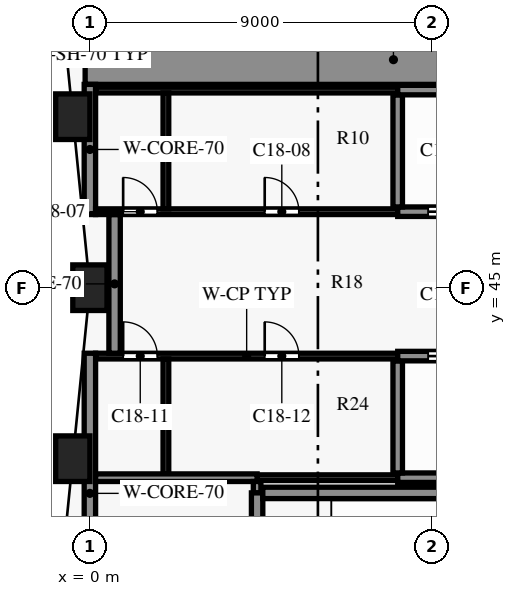
"""IFC4 building model, lengths in metres.
Left out: names, types, materials, properties, quantities, classifications, styles, units other than length and angle.
Written with IfcOpenShell. Run it as: python <this file> out.ifc"""

import sys

from ifc_helpers import new_model, si_unit, direction, frame, frame_2d, origin, origin_2d, place, context, subcontext, project, spatial, rectangle, extrude, element, fill, save


model = new_model("IFC4")
c1 = context("Model", 3, precision=1e-05, world=origin(), true_north=direction((0.0, 1.0)))
c2 = subcontext(c1, "Body", "Model", "MODEL_VIEW")
j1 = project(units=[si_unit("LENGTHUNIT", "METRE"), si_unit("PLANEANGLEUNIT", "RADIAN")], contexts=[c1])
p1 = place(None, origin())
s1 = spatial("IfcSite", under=j1, at=p1, CompositionType="ELEMENT")
p2 = place(p1, origin())
s2 = spatial("IfcBuilding", under=s1, at=p2, CompositionType="ELEMENT")
p3 = place(p2, frame((0.0, 0.0, 130.3)))
s3 = spatial("IfcBuildingStorey", under=s2, at=p3, CompositionType="ELEMENT", Elevation=130.3)
for number, where, z_axis, x_axis in (
    (1, (-0.45, 49.5, 0.0), (0.0, 0.0, 1.0), (0.1, -0.995, 0.0)),
    (2, (0.0, 45.0, 0.0), (0.0, 0.0, 1.0), (0.0, -1.0, 0.0)),
    (3, (-0.45, 40.5, 0.0), (0.0, 0.0, 1.0), (-0.1, -0.995, 0.0)),
):
    element("IfcColumn", number, at=place(p3, frame(where, z_axis=z_axis, x_axis=x_axis)), inside=s3, PredefinedType="COLUMN", context=c2, shape_type="SweptSolid", body=[
        extrude(rectangle(XDim=0.9, YDim=1.2, at=origin_2d()), origin(), (0.0, 0.0, 1.0), 3.8),
    ])
p4 = place(p3, frame((4.55, 39.6, 0.0), z_axis=(0.0, 0.0, 1.0), x_axis=(1.0, 0.0, 0.0)))
e4 = element("IfcWall", 4, at=p4, inside=s3, PredefinedType="SHEAR", context=c2, shape_type="SweptSolid", body=[
    extrude(rectangle(XDim=7.7, YDim=0.3, at=frame_2d((3.85, 0.0))), origin(), (0.0, 0.0, 1.0), 3.5),
])
p5 = place(p3, frame((4.4, 40.0, 0.0), z_axis=(0.0, 0.0, 1.0), x_axis=(1.0, 0.0, 0.0)))
e5 = element("IfcWall", 5, at=p5, inside=s3, PredefinedType="PARTITIONING", context=c2, shape_type="SweptSolid", body=[
    extrude(rectangle(XDim=3.7, YDim=0.15, at=frame_2d((1.85, 0.0))), origin(), (0.0, 0.0, 1.0), 3.5),
])
p6 = place(p3, frame((0.15, 40.0, 0.0), z_axis=(0.0, 0.0, 1.0), x_axis=(1.0, 0.0, 0.0)))
e6 = element("IfcWall", 6, at=p6, inside=s3, PredefinedType="PARTITIONING", context=c2, shape_type="SweptSolid", body=[
    extrude(rectangle(XDim=4.25, YDim=0.2, at=frame_2d((2.125, 0.0))), origin(), (0.0, 0.0, 1.0), 3.5),
])
p7 = place(p3, frame((8.1, 40.0, 0.0), z_axis=(0.0, 0.0, 1.0), x_axis=(1.0, 0.0, 0.0)))
e7 = element("IfcWall", 7, at=p7, inside=s3, PredefinedType="SHEAR", context=c2, shape_type="SweptSolid", body=[
    extrude(rectangle(XDim=13.5, YDim=0.25, at=frame_2d((6.75, 0.0))), origin(), (0.0, 0.0, 1.0), 3.5),
])
p8 = place(p3, frame((0.15, 43.2, 0.0), z_axis=(0.0, 0.0, 1.0), x_axis=(1.0, 0.0, 0.0)))
e8 = element("IfcWall", 8, at=p8, inside=s3, PredefinedType="PARTITIONING", context=c2, shape_type="SweptSolid", body=[
    extrude(rectangle(XDim=7.95, YDim=0.15, at=frame_2d((3.975, 0.0))), origin(), (0.0, 0.0, 1.0), 3.5),
])
p9 = place(p8, frame((0.725, 0.0, 0.0)))
e9 = element("IfcOpeningElement", 9, at=p9, cuts=e8, PredefinedType="OPENING", context=c2, shape_type="SweptSolid", body=[
    extrude(rectangle(XDim=0.9, YDim=2.1, at=frame_2d((0.45, 1.05))), frame((0.0, 0.085, 0.0), z_axis=(0.0, -1.0, 0.0), x_axis=(1.0, 0.0, 0.0)), (0.0, 0.0, 1.0), 0.17),
])
p10 = place(p8, frame((4.45, 0.0, 0.0)))
e10 = element("IfcOpeningElement", 10, at=p10, cuts=e8, PredefinedType="OPENING", context=c2, shape_type="SweptSolid", body=[
    extrude(rectangle(XDim=0.9, YDim=2.1, at=frame_2d((0.45, 1.05))), frame((0.0, 0.085, 0.0), z_axis=(0.0, -1.0, 0.0), x_axis=(1.0, 0.0, 0.0)), (0.0, 0.0, 1.0), 0.17),
])
p11 = place(p3, frame((8.1, 43.2, 0.0), z_axis=(0.0, 0.0, 1.0), x_axis=(1.0, 0.0, 0.0)))
e11 = element("IfcWall", 11, at=p11, inside=s3, PredefinedType="SHEAR", context=c2, shape_type="SweptSolid", body=[
    extrude(rectangle(XDim=13.5, YDim=0.25, at=frame_2d((6.75, 0.0))), origin(), (0.0, 0.0, 1.0), 3.5),
])
p12 = place(p11, frame((0.8, 0.0, 0.0)))
e12 = element("IfcOpeningElement", 12, at=p12, cuts=e11, PredefinedType="OPENING", context=c2, shape_type="SweptSolid", body=[
    extrude(rectangle(XDim=1.1, YDim=2.1, at=frame_2d((0.55, 1.05))), frame((0.0, 0.135, 0.0), z_axis=(0.0, -1.0, 0.0), x_axis=(1.0, 0.0, 0.0)), (0.0, 0.0, 1.0), 0.27),
])
p13 = place(p11, frame((3.5, 0.0, 0.0)))
e13 = element("IfcOpeningElement", 13, at=p13, cuts=e11, PredefinedType="OPENING", context=c2, shape_type="SweptSolid", body=[
    extrude(rectangle(XDim=1.1, YDim=2.1, at=frame_2d((0.55, 1.05))), frame((0.0, 0.135, 0.0), z_axis=(0.0, -1.0, 0.0), x_axis=(1.0, 0.0, 0.0)), (0.0, 0.0, 1.0), 0.27),
])
p14 = place(p11, frame((6.2, 0.0, 0.0)))
e14 = element("IfcOpeningElement", 14, at=p14, cuts=e11, PredefinedType="OPENING", context=c2, shape_type="SweptSolid", body=[
    extrude(rectangle(XDim=1.1, YDim=2.1, at=frame_2d((0.55, 1.05))), frame((0.0, 0.135, 0.0), z_axis=(0.0, -1.0, 0.0), x_axis=(1.0, 0.0, 0.0)), (0.0, 0.0, 1.0), 0.27),
])
p15 = place(p11, frame((8.9, 0.0, 0.0)))
e15 = element("IfcOpeningElement", 15, at=p15, cuts=e11, PredefinedType="OPENING", context=c2, shape_type="SweptSolid", body=[
    extrude(rectangle(XDim=1.1, YDim=2.1, at=frame_2d((0.55, 1.05))), frame((0.0, 0.135, 0.0), z_axis=(0.0, -1.0, 0.0), x_axis=(1.0, 0.0, 0.0)), (0.0, 0.0, 1.0), 0.27),
])
p16 = place(p11, frame((11.6, 0.0, 0.0)))
e16 = element("IfcOpeningElement", 16, at=p16, cuts=e11, PredefinedType="OPENING", context=c2, shape_type="SweptSolid", body=[
    extrude(rectangle(XDim=1.1, YDim=2.1, at=frame_2d((0.55, 1.05))), frame((0.0, 0.135, 0.0), z_axis=(0.0, -1.0, 0.0), x_axis=(1.0, 0.0, 0.0)), (0.0, 0.0, 1.0), 0.27),
])
p17 = place(p3, frame((0.15, 47.0, 0.0), z_axis=(0.0, 0.0, 1.0), x_axis=(1.0, 0.0, 0.0)))
e17 = element("IfcWall", 17, at=p17, inside=s3, PredefinedType="PARTITIONING", context=c2, shape_type="SweptSolid", body=[
    extrude(rectangle(XDim=7.95, YDim=0.15, at=frame_2d((3.975, 0.0))), origin(), (0.0, 0.0, 1.0), 3.5),
])
p18 = place(p17, frame((0.725, 0.0, 0.0)))
e18 = element("IfcOpeningElement", 18, at=p18, cuts=e17, PredefinedType="OPENING", context=c2, shape_type="SweptSolid", body=[
    extrude(rectangle(XDim=0.9, YDim=2.1, at=frame_2d((0.45, 1.05))), frame((0.0, 0.085, 0.0), z_axis=(0.0, -1.0, 0.0), x_axis=(1.0, 0.0, 0.0)), (0.0, 0.0, 1.0), 0.17),
])
p19 = place(p17, frame((4.45, 0.0, 0.0)))
e19 = element("IfcOpeningElement", 19, at=p19, cuts=e17, PredefinedType="OPENING", context=c2, shape_type="SweptSolid", body=[
    extrude(rectangle(XDim=0.9, YDim=2.1, at=frame_2d((0.45, 1.05))), frame((0.0, 0.085, 0.0), z_axis=(0.0, -1.0, 0.0), x_axis=(1.0, 0.0, 0.0)), (0.0, 0.0, 1.0), 0.17),
])
p20 = place(p3, frame((8.1, 47.0, 0.0), z_axis=(0.0, 0.0, 1.0), x_axis=(1.0, 0.0, 0.0)))
e20 = element("IfcWall", 20, at=p20, inside=s3, PredefinedType="SHEAR", context=c2, shape_type="SweptSolid", body=[
    extrude(rectangle(XDim=8.1, YDim=0.25, at=frame_2d((4.05, 0.0))), origin(), (0.0, 0.0, 1.0), 3.5),
])
p21 = place(p20, frame((0.8, 0.0, 0.0)))
e21 = element("IfcOpeningElement", 21, at=p21, cuts=e20, PredefinedType="OPENING", context=c2, shape_type="SweptSolid", body=[
    extrude(rectangle(XDim=1.1, YDim=2.1, at=frame_2d((0.55, 1.05))), frame((0.0, 0.135, 0.0), z_axis=(0.0, -1.0, 0.0), x_axis=(1.0, 0.0, 0.0)), (0.0, 0.0, 1.0), 0.27),
])
p22 = place(p20, frame((3.5, 0.0, 0.0)))
e22 = element("IfcOpeningElement", 22, at=p22, cuts=e20, PredefinedType="OPENING", context=c2, shape_type="SweptSolid", body=[
    extrude(rectangle(XDim=1.1, YDim=2.1, at=frame_2d((0.55, 1.05))), frame((0.0, 0.135, 0.0), z_axis=(0.0, -1.0, 0.0), x_axis=(1.0, 0.0, 0.0)), (0.0, 0.0, 1.0), 0.27),
])
p23 = place(p20, frame((6.2, 0.0, 0.0)))
e23 = element("IfcOpeningElement", 23, at=p23, cuts=e20, PredefinedType="OPENING", context=c2, shape_type="SweptSolid", body=[
    extrude(rectangle(XDim=1.1, YDim=2.1, at=frame_2d((0.55, 1.05))), frame((0.0, 0.135, 0.0), z_axis=(0.0, -1.0, 0.0), x_axis=(1.0, 0.0, 0.0)), (0.0, 0.0, 1.0), 0.27),
])
p24 = place(p3, frame((0.15, 50.2, 0.0), z_axis=(0.0, 0.0, 1.0), x_axis=(1.0, 0.0, 0.0)))
e24 = element("IfcWall", 24, at=p24, inside=s3, PredefinedType="PARTITIONING", context=c2, shape_type="SweptSolid", body=[
    extrude(rectangle(XDim=7.95, YDim=0.15, at=frame_2d((3.975, 0.0))), origin(), (0.0, 0.0, 1.0), 3.5),
])
p25 = place(p3, frame((8.1, 50.2, 0.0), z_axis=(0.0, 0.0, 1.0), x_axis=(1.0, 0.0, 0.0)))
e25 = element("IfcWall", 25, at=p25, inside=s3, PredefinedType="SHEAR", context=c2, shape_type="SweptSolid", body=[
    extrude(rectangle(XDim=7.975, YDim=0.25, at=frame_2d((3.987, 0.0))), origin(), (0.0, 0.0, 1.0), 3.5),
])
p26 = place(p3, frame((-0.125, 51.0, 0.0), z_axis=(0.0, 0.0, 1.0), x_axis=(1.0, 0.0, 0.0)))
e26 = element("IfcWall", 26, at=p26, inside=s3, PredefinedType="SHEAR", context=c2, shape_type="SweptSolid", body=[
    extrude(rectangle(XDim=16.225, YDim=1.3, at=frame_2d((8.113, 0.0))), origin(), (0.0, 0.0, 1.0), 3.5),
])
p27 = place(p3, frame((0.0, 35.9, 0.0), z_axis=(0.0, 0.0, 1.0), x_axis=(0.0, 1.0, 0.0)))
e27 = element("IfcWall", 27, at=p27, inside=s3, PredefinedType="SHEAR", context=c2, shape_type="SweptSolid", body=[
    extrude(rectangle(XDim=7.375, YDim=0.3, at=frame_2d((3.688, 0.0))), origin(), (0.0, 0.0, 1.0), 3.5),
])
p28 = place(p3, frame((0.0, 46.925, 0.0), z_axis=(0.0, 0.0, 1.0), x_axis=(0.0, 1.0, 0.0)))
e28 = element("IfcWall", 28, at=p28, inside=s3, PredefinedType="SHEAR", context=c2, shape_type="SweptSolid", body=[
    extrude(rectangle(XDim=3.425, YDim=0.3, at=frame_2d((1.712, 0.0))), origin(), (0.0, 0.0, 1.0), 3.5),
])
p29 = place(p3, frame((0.65, 43.275, 0.0), z_axis=(0.0, 0.0, 1.0), x_axis=(0.0, 1.0, 0.0)))
e29 = element("IfcWall", 29, at=p29, inside=s3, PredefinedType="SHEAR", context=c2, shape_type="SweptSolid", body=[
    extrude(rectangle(XDim=3.65, YDim=0.3, at=frame_2d((1.825, 0.0))), origin(), (0.0, 0.0, 1.0), 3.5),
])
p30 = place(p3, frame((2.0, 40.1, 0.0), z_axis=(0.0, 0.0, 1.0), x_axis=(0.0, 1.0, 0.0)))
e30 = element("IfcWall", 30, at=p30, inside=s3, PredefinedType="PARTITIONING", context=c2, shape_type="SweptSolid", body=[
    extrude(rectangle(XDim=3.025, YDim=0.15, at=frame_2d((1.512, 0.0))), origin(), (0.0, 0.0, 1.0), 3.5),
])
p31 = place(p3, frame((2.0, 47.075, 0.0), z_axis=(0.0, 0.0, 1.0), x_axis=(0.0, 1.0, 0.0)))
e31 = element("IfcWall", 31, at=p31, inside=s3, PredefinedType="PARTITIONING", context=c2, shape_type="SweptSolid", body=[
    extrude(rectangle(XDim=3.05, YDim=0.15, at=frame_2d((1.525, 0.0))), origin(), (0.0, 0.0, 1.0), 3.5),
])
p32 = place(p3, frame((4.4, 39.6, 0.0), z_axis=(0.0, 0.0, 1.0), x_axis=(0.0, 1.0, 0.0)))
e32 = element("IfcWall", 32, at=p32, inside=s3, PredefinedType="PARTITIONING", context=c2, shape_type="SweptSolid", body=[
    extrude(rectangle(XDim=0.3, YDim=0.2, at=frame_2d((0.15, 0.0))), origin(), (0.0, 0.0, 1.0), 3.5),
])
p33 = place(p3, frame((4.4, 36.15, 0.0), z_axis=(0.0, 0.0, 1.0), x_axis=(0.0, 1.0, 0.0)))
e33 = element("IfcWall", 33, at=p33, inside=s3, PredefinedType="SHEAR", context=c2, shape_type="SweptSolid", body=[
    extrude(rectangle(XDim=3.45, YDim=0.3, at=frame_2d((1.725, 0.0))), origin(), (0.0, 0.0, 1.0), 3.5),
])
for number, where, z_axis, x_axis in (
    (34, (8.1, 40.125, 0.0), (0.0, 0.0, 1.0), (0.0, 1.0, 0.0)),
    (35, (8.1, 47.125, 0.0), (0.0, 0.0, 1.0), (0.0, 1.0, 0.0)),
):
    element("IfcWall", number, at=place(p3, frame(where, z_axis=z_axis, x_axis=x_axis)), inside=s3, PredefinedType="SHEAR", context=c2, shape_type="SweptSolid", body=[
        extrude(rectangle(XDim=2.95, YDim=0.25, at=frame_2d((1.475, 0.0))), origin(), (0.0, 0.0, 1.0), 3.5),
    ])
p34 = place(p18, origin())
e36 = element("IfcDoor", 36, at=p34, inside=s3, OperationType="SINGLE_SWING_RIGHT", PredefinedType="DOOR", context=c2, shape_type="SweptSolid", body=[
    extrude(rectangle(XDim=0.9, YDim=2.1, at=frame_2d((0.45, 1.05))), frame((0.0, 0.025, 0.0), z_axis=(0.0, -1.0, 0.0), x_axis=(1.0, 0.0, 0.0)), (0.0, 0.0, 1.0), 0.05),
])
fill(e18, e36)
p35 = place(p19, origin())
e37 = element("IfcDoor", 37, at=p35, inside=s3, OperationType="SINGLE_SWING_LEFT", PredefinedType="DOOR", context=c2, shape_type="SweptSolid", body=[
    extrude(rectangle(XDim=0.9, YDim=2.1, at=frame_2d((0.45, 1.05))), frame((0.0, 0.025, 0.0), z_axis=(0.0, -1.0, 0.0), x_axis=(1.0, 0.0, 0.0)), (0.0, 0.0, 1.0), 0.05),
])
fill(e19, e37)
p36 = place(p9, origin())
e38 = element("IfcDoor", 38, at=p36, inside=s3, OperationType="SINGLE_SWING_LEFT", PredefinedType="DOOR", context=c2, shape_type="SweptSolid", body=[
    extrude(rectangle(XDim=0.9, YDim=2.1, at=frame_2d((0.45, 1.05))), frame((0.0, 0.025, 0.0), z_axis=(0.0, -1.0, 0.0), x_axis=(1.0, 0.0, 0.0)), (0.0, 0.0, 1.0), 0.05),
])
fill(e9, e38)
p37 = place(p10, origin())
e39 = element("IfcDoor", 39, at=p37, inside=s3, OperationType="SINGLE_SWING_RIGHT", PredefinedType="DOOR", context=c2, shape_type="SweptSolid", body=[
    extrude(rectangle(XDim=0.9, YDim=2.1, at=frame_2d((0.45, 1.05))), frame((0.0, 0.025, 0.0), z_axis=(0.0, -1.0, 0.0), x_axis=(1.0, 0.0, 0.0)), (0.0, 0.0, 1.0), 0.05),
])
fill(e10, e39)
p38 = place(p12, origin())
e40 = element("IfcDoor", 40, at=p38, inside=s3, OperationType="DOUBLE_DOOR_SLIDING", PredefinedType="DOOR", context=c2, shape_type="SweptSolid", body=[
    extrude(rectangle(XDim=1.1, YDim=2.1, at=frame_2d((0.55, 1.05))), frame((0.0, 0.025, 0.0), z_axis=(0.0, -1.0, 0.0), x_axis=(1.0, 0.0, 0.0)), (0.0, 0.0, 1.0), 0.05),
])
fill(e12, e40)
p39 = place(p21, origin())
e41 = element("IfcDoor", 41, at=p39, inside=s3, OperationType="DOUBLE_DOOR_SLIDING", PredefinedType="DOOR", context=c2, shape_type="SweptSolid", body=[
    extrude(rectangle(XDim=1.1, YDim=2.1, at=frame_2d((0.55, 1.05))), frame((0.0, 0.025, 0.0), z_axis=(0.0, -1.0, 0.0), x_axis=(1.0, 0.0, 0.0)), (0.0, 0.0, 1.0), 0.05),
])
fill(e21, e41)
save(model, sys.argv[1])
